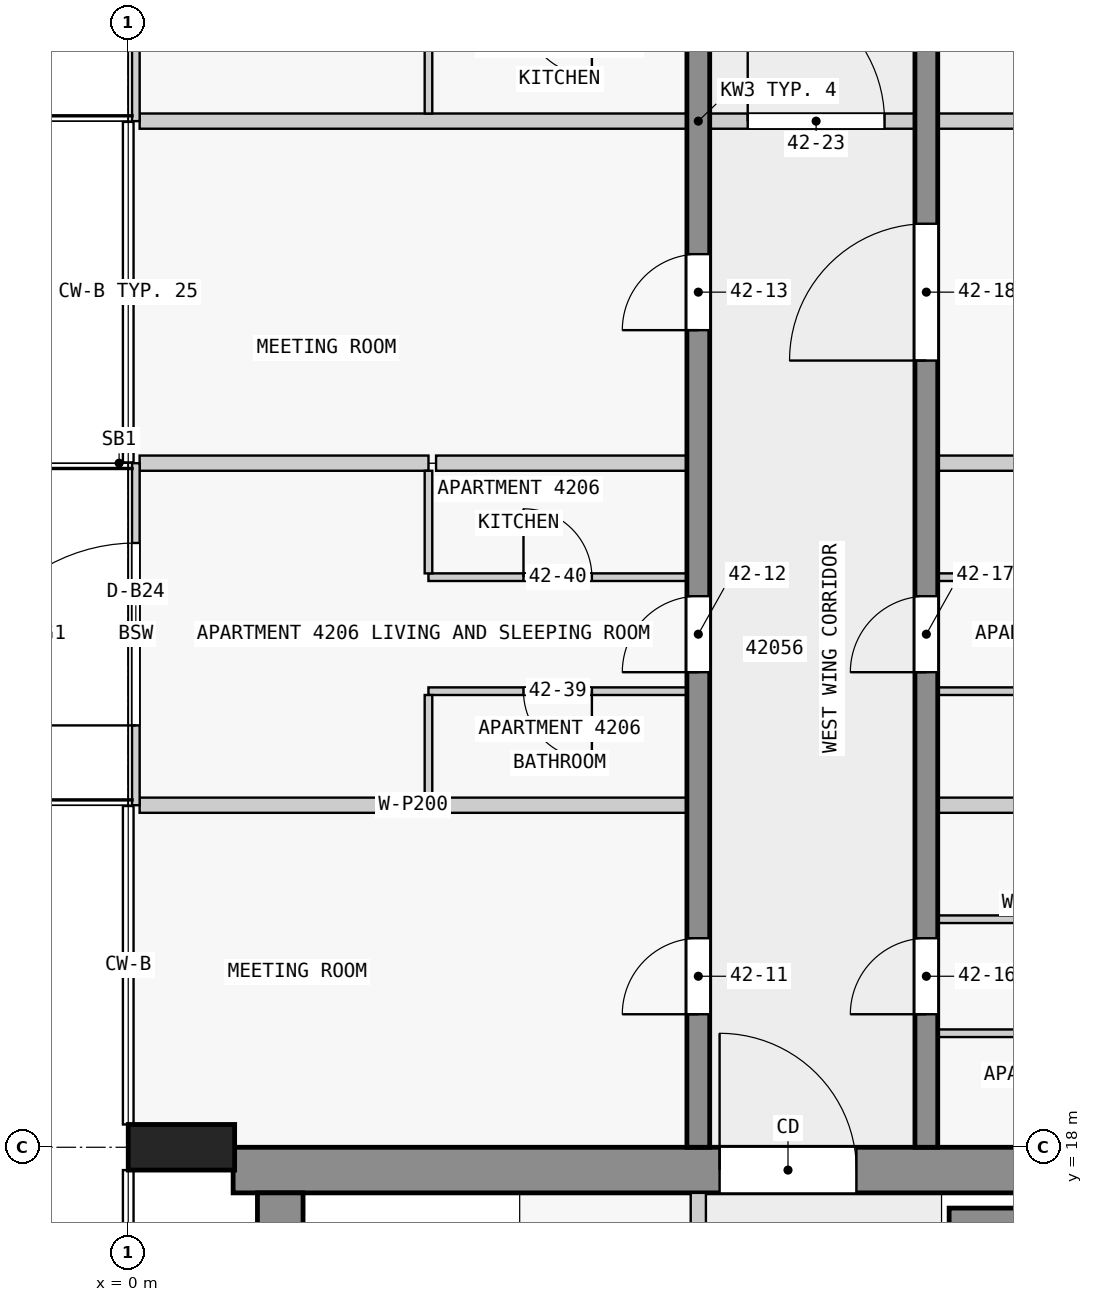
"""IFC4 building model, lengths in metres.
Left out: names, types, materials, properties, quantities, classifications, styles, units other than length and angle.
Written with IfcOpenShell. Run it as: python <this file> out.ifc"""

import sys

from ifc_helpers import new_model, si_unit, direction, frame, frame_2d, origin, origin_2d, place, context, subcontext, project, spatial, rectangle, extrude, element, fill, save


model = new_model("IFC4")
c1 = context("Model", 3, precision=1e-05, world=origin(), true_north=direction((0.0, 1.0)))
c2 = subcontext(c1, "Body", "Model", "MODEL_VIEW")
j1 = project(units=[si_unit("LENGTHUNIT", "METRE"), si_unit("PLANEANGLEUNIT", "RADIAN")], contexts=[c1])
p1 = place(None, origin())
s1 = spatial("IfcSite", under=j1, at=p1, CompositionType="ELEMENT")
p2 = place(p1, origin())
s2 = spatial("IfcBuilding", under=s1, at=p2, CompositionType="ELEMENT")
p3 = place(p2, frame((0.0, 0.0, 163.9)))
s3 = spatial("IfcBuildingStorey", under=s2, at=p3, CompositionType="ELEMENT", Elevation=163.9)
p4 = place(p3, frame((0.7, 18.0, 0.0), z_axis=(0.0, 0.0, 1.0), x_axis=(0.0, 1.0, 0.0)))
e1 = element("IfcColumn", 1, at=p4, inside=s3, PredefinedType="COLUMN", context=c2, shape_type="SweptSolid", body=[
    extrude(rectangle(XDim=0.6, YDim=1.4, at=origin_2d()), origin(), (0.0, 0.0, 1.0), 3.5),
])
p5 = place(p3, frame((1.38, 17.7, 0.0), z_axis=(0.0, 0.0, 1.0), x_axis=(1.0, 0.0, 0.0)))
e2 = element("IfcWall", 2, at=p5, inside=s3, PredefinedType="SHEAR", context=c2, shape_type="SweptSolid", body=[
    extrude(rectangle(XDim=21.12, YDim=0.6, at=frame_2d((10.56, 0.0))), origin(), (0.0, 0.0, 1.0), 3.25),
])
p6 = place(p5, frame((6.4, 0.0, 0.0)))
e3 = element("IfcOpeningElement", 3, at=p6, cuts=e2, PredefinedType="OPENING", context=c2, shape_type="SweptSolid", body=[
    extrude(rectangle(XDim=1.8, YDim=2.1, at=frame_2d((0.9, 1.05))), frame((0.0, 0.31, 0.0), z_axis=(0.0, -1.0, 0.0), x_axis=(1.0, 0.0, 0.0)), (0.0, 0.0, 1.0), 0.62),
])
p7 = place(p3, frame((2.0, 2.5, 0.0), z_axis=(0.0, 0.0, 1.0), x_axis=(0.0, 1.0, 0.0)))
e4 = element("IfcWall", 4, at=p7, inside=s3, PredefinedType="SHEAR", context=c2, shape_type="SweptSolid", body=[
    extrude(rectangle(XDim=14.9, YDim=0.6, at=frame_2d((7.45, 0.0))), origin(), (0.0, 0.0, 1.0), 3.25),
])
p8 = place(p3, frame((10.8, 17.05, 0.0), z_axis=(0.0, 0.0, 1.0), x_axis=(1.0, 0.0, 0.0)))
e5 = element("IfcWall", 5, at=p8, inside=s3, PredefinedType="SHEAR", context=c2, shape_type="SweptSolid", body=[
    extrude(rectangle(XDim=7.8, YDim=0.3, at=frame_2d((3.9, 0.0))), origin(), (0.0, 0.0, 1.0), 3.25),
])
p9 = place(p3, frame((7.5, 18.0, 0.0), z_axis=(0.0, 0.0, 1.0), x_axis=(0.0, 1.0, 0.0)))
e6 = element("IfcWall", 6, at=p9, inside=s3, PredefinedType="SHEAR", context=c2, shape_type="SweptSolid", body=[
    extrude(rectangle(XDim=27.0, YDim=0.3, at=frame_2d((13.5, 0.0))), origin(), (0.0, 0.0, 1.0), 3.25),
])
p10 = place(p9, frame((1.75, 0.0, 0.0)))
e7 = element("IfcOpeningElement", 7, at=p10, cuts=e6, PredefinedType="OPENING", context=c2, shape_type="SweptSolid", body=[
    extrude(rectangle(XDim=1.0, YDim=2.1, at=frame_2d((0.5, 1.05))), frame((0.0, 0.16, 0.0), z_axis=(0.0, -1.0, 0.0), x_axis=(1.0, 0.0, 0.0)), (0.0, 0.0, 1.0), 0.32),
])
p11 = place(p9, frame((6.25, 0.0, 0.0)))
e8 = element("IfcOpeningElement", 8, at=p11, cuts=e6, PredefinedType="OPENING", context=c2, shape_type="SweptSolid", body=[
    extrude(rectangle(XDim=1.0, YDim=2.1, at=frame_2d((0.5, 1.05))), frame((0.0, 0.16, 0.0), z_axis=(0.0, -1.0, 0.0), x_axis=(1.0, 0.0, 0.0)), (0.0, 0.0, 1.0), 0.32),
])
p12 = place(p9, frame((10.75, 0.0, 0.0)))
e9 = element("IfcOpeningElement", 9, at=p12, cuts=e6, PredefinedType="OPENING", context=c2, shape_type="SweptSolid", body=[
    extrude(rectangle(XDim=1.0, YDim=2.1, at=frame_2d((0.5, 1.05))), frame((0.0, 0.16, 0.0), z_axis=(0.0, -1.0, 0.0), x_axis=(1.0, 0.0, 0.0)), (0.0, 0.0, 1.0), 0.32),
])
p13 = place(p9, frame((15.25, 0.0, 0.0)))
e10 = element("IfcOpeningElement", 10, at=p13, cuts=e6, PredefinedType="OPENING", context=c2, shape_type="SweptSolid", body=[
    extrude(rectangle(XDim=1.0, YDim=2.1, at=frame_2d((0.5, 1.05))), frame((0.0, 0.16, 0.0), z_axis=(0.0, -1.0, 0.0), x_axis=(1.0, 0.0, 0.0)), (0.0, 0.0, 1.0), 0.32),
])
p14 = place(p9, frame((21.35, 0.0, 0.0)))
e11 = element("IfcOpeningElement", 11, at=p14, cuts=e6, PredefinedType="OPENING", context=c2, shape_type="SweptSolid", body=[
    extrude(rectangle(XDim=1.0, YDim=2.1, at=frame_2d((0.5, 1.05))), frame((0.0, 0.16, 0.0), z_axis=(0.0, -1.0, 0.0), x_axis=(1.0, 0.0, 0.0)), (0.0, 0.0, 1.0), 0.32),
])
p15 = place(p3, frame((10.5, 18.0, 0.0), z_axis=(0.0, 0.0, 1.0), x_axis=(0.0, 1.0, 0.0)))
e12 = element("IfcWall", 12, at=p15, inside=s3, PredefinedType="SHEAR", context=c2, shape_type="SweptSolid", body=[
    extrude(rectangle(XDim=27.0, YDim=0.3, at=frame_2d((13.5, 0.0))), origin(), (0.0, 0.0, 1.0), 3.25),
])
p16 = place(p15, frame((1.75, 0.0, 0.0)))
e13 = element("IfcOpeningElement", 13, at=p16, cuts=e12, PredefinedType="OPENING", context=c2, shape_type="SweptSolid", body=[
    extrude(rectangle(XDim=1.0, YDim=2.1, at=frame_2d((0.5, 1.05))), frame((0.0, 0.16, 0.0), z_axis=(0.0, -1.0, 0.0), x_axis=(1.0, 0.0, 0.0)), (0.0, 0.0, 1.0), 0.32),
])
p17 = place(p15, frame((6.25, 0.0, 0.0)))
e14 = element("IfcOpeningElement", 14, at=p17, cuts=e12, PredefinedType="OPENING", context=c2, shape_type="SweptSolid", body=[
    extrude(rectangle(XDim=1.0, YDim=2.1, at=frame_2d((0.5, 1.05))), frame((0.0, 0.16, 0.0), z_axis=(0.0, -1.0, 0.0), x_axis=(1.0, 0.0, 0.0)), (0.0, 0.0, 1.0), 0.32),
])
p18 = place(p15, frame((10.35, 0.0, 0.0)))
e15 = element("IfcOpeningElement", 15, at=p18, cuts=e12, PredefinedType="OPENING", context=c2, shape_type="SweptSolid", body=[
    extrude(rectangle(XDim=1.8, YDim=2.1, at=frame_2d((0.9, 1.05))), frame((0.0, 0.16, 0.0), z_axis=(0.0, -1.0, 0.0), x_axis=(1.0, 0.0, 0.0)), (0.0, 0.0, 1.0), 0.32),
])
p19 = place(p15, frame((17.55, 0.0, 0.0)))
e16 = element("IfcOpeningElement", 16, at=p19, cuts=e12, PredefinedType="OPENING", context=c2, shape_type="SweptSolid", body=[
    extrude(rectangle(XDim=1.0, YDim=2.1, at=frame_2d((0.5, 1.05))), frame((0.0, 0.16, 0.0), z_axis=(0.0, -1.0, 0.0), x_axis=(1.0, 0.0, 0.0)), (0.0, 0.0, 1.0), 0.32),
])
p20 = place(p15, frame((23.25, 0.0, 0.0)))
e17 = element("IfcOpeningElement", 17, at=p20, cuts=e12, PredefinedType="OPENING", context=c2, shape_type="SweptSolid", body=[
    extrude(rectangle(XDim=0.9, YDim=2.1, at=frame_2d((0.45, 1.05))), frame((0.0, 0.16, 0.0), z_axis=(0.0, -1.0, 0.0), x_axis=(1.0, 0.0, 0.0)), (0.0, 0.0, 1.0), 0.32),
])
p21 = place(p15, frame((25.45, 0.0, 0.0)))
e18 = element("IfcOpeningElement", 18, at=p21, cuts=e12, PredefinedType="OPENING", context=c2, shape_type="SweptSolid", body=[
    extrude(rectangle(XDim=1.0, YDim=2.1, at=frame_2d((0.5, 1.05))), frame((0.0, 0.16, 0.0), z_axis=(0.0, -1.0, 0.0), x_axis=(1.0, 0.0, 0.0)), (0.0, 0.0, 1.0), 0.32),
])
p22 = place(p3, frame((0.1, 22.5, 0.0), z_axis=(0.0, 0.0, 1.0), x_axis=(0.0, 1.0, 0.0)))
e19 = element("IfcWall", 19, at=p22, inside=s3, PredefinedType="STANDARD", context=c2, shape_type="SweptSolid", body=[
    extrude(rectangle(XDim=4.5, YDim=0.1, at=frame_2d((2.25, 0.0))), origin(), (0.0, 0.0, 1.0), 3.25),
])
p23 = place(p22, frame((1.05, 0.0, 0.0)))
e20 = element("IfcOpeningElement", 20, at=p23, cuts=e19, PredefinedType="OPENING", context=c2, shape_type="SweptSolid", body=[
    extrude(rectangle(XDim=2.4, YDim=2.4, at=frame_2d((1.2, 1.2))), frame((0.0, 0.06, 0.0), z_axis=(0.0, -1.0, 0.0), x_axis=(1.0, 0.0, 0.0)), (0.0, 0.0, 1.0), 0.12),
])
p24 = place(p3, frame((0.1, 31.5, 0.0), z_axis=(0.0, 0.0, 1.0), x_axis=(0.0, 1.0, 0.0)))
e21 = element("IfcWall", 21, at=p24, inside=s3, PredefinedType="STANDARD", context=c2, shape_type="SweptSolid", body=[
    extrude(rectangle(XDim=4.5, YDim=0.1, at=frame_2d((2.25, 0.0))), origin(), (0.0, 0.0, 1.0), 3.25),
])
p25 = place(p24, frame((1.05, 0.0, 0.0)))
e22 = element("IfcOpeningElement", 22, at=p25, cuts=e21, PredefinedType="OPENING", context=c2, shape_type="SweptSolid", body=[
    extrude(rectangle(XDim=2.4, YDim=2.4, at=frame_2d((1.2, 1.2))), frame((0.0, 0.06, 0.0), z_axis=(0.0, -1.0, 0.0), x_axis=(1.0, 0.0, 0.0)), (0.0, 0.0, 1.0), 0.12),
])
p26 = place(p3, frame((7.5, 10.1, 0.0), z_axis=(0.0, 0.0, 1.0), x_axis=(0.0, 1.0, 0.0)))
e23 = element("IfcWall", 23, at=p26, inside=s3, PredefinedType="PARTITIONING", context=c2, shape_type="SweptSolid", body=[
    extrude(rectangle(XDim=7.3, YDim=0.2, at=frame_2d((3.65, 0.0))), origin(), (0.0, 0.0, 1.0), 3.25),
])
p27 = place(p26, frame((1.05, 0.0, 0.0)))
e24 = element("IfcOpeningElement", 24, at=p27, cuts=e23, PredefinedType="OPENING", context=c2, shape_type="SweptSolid", body=[
    extrude(rectangle(XDim=0.9, YDim=2.1, at=frame_2d((0.45, 1.05))), frame((0.0, 0.11, 0.0), z_axis=(0.0, -1.0, 0.0), x_axis=(1.0, 0.0, 0.0)), (0.0, 0.0, 1.0), 0.22),
])
p28 = place(p26, frame((4.7, 0.0, 0.0)))
e25 = element("IfcOpeningElement", 25, at=p28, cuts=e23, PredefinedType="OPENING", context=c2, shape_type="SweptSolid", body=[
    extrude(rectangle(XDim=0.9, YDim=2.1, at=frame_2d((0.45, 1.05))), frame((0.0, 0.11, 0.0), z_axis=(0.0, -1.0, 0.0), x_axis=(1.0, 0.0, 0.0)), (0.0, 0.0, 1.0), 0.22),
])
p29 = place(p3, frame((14.05, 19.5, 0.0), z_axis=(0.0, 0.0, 1.0), x_axis=(-1.0, 0.0, 0.0)))
e26 = element("IfcWall", 26, at=p29, inside=s3, PredefinedType="PARTITIONING", context=c2, shape_type="SweptSolid", body=[
    extrude(rectangle(XDim=3.4, YDim=0.1, at=frame_2d((1.7, 0.0))), origin(), (0.0, 0.0, 1.0), 3.25),
])
p30 = place(p29, frame((1.25, 0.0, 0.0)))
e27 = element("IfcOpeningElement", 27, at=p30, cuts=e26, PredefinedType="OPENING", context=c2, shape_type="SweptSolid", body=[
    extrude(rectangle(XDim=0.9, YDim=2.1, at=frame_2d((0.45, 1.05))), frame((0.0, 0.06, 0.0), z_axis=(0.0, -1.0, 0.0), x_axis=(1.0, 0.0, 0.0)), (0.0, 0.0, 1.0), 0.12),
])
p31 = place(p3, frame((10.65, 21.0, 0.0), z_axis=(0.0, 0.0, 1.0), x_axis=(1.0, 0.0, 0.0)))
e28 = element("IfcWall", 28, at=p31, inside=s3, PredefinedType="PARTITIONING", context=c2, shape_type="SweptSolid", body=[
    extrude(rectangle(XDim=3.4, YDim=0.1, at=frame_2d((1.7, 0.0))), origin(), (0.0, 0.0, 1.0), 3.25),
])
p32 = place(p31, frame((1.25, 0.0, 0.0)))
e29 = element("IfcOpeningElement", 29, at=p32, cuts=e28, PredefinedType="OPENING", context=c2, shape_type="SweptSolid", body=[
    extrude(rectangle(XDim=0.9, YDim=2.1, at=frame_2d((0.45, 1.05))), frame((0.0, 0.06, 0.0), z_axis=(0.0, -1.0, 0.0), x_axis=(1.0, 0.0, 0.0)), (0.0, 0.0, 1.0), 0.12),
])
p33 = place(p3, frame((7.35, 22.5, 0.0), z_axis=(0.0, 0.0, 1.0), x_axis=(-1.0, 0.0, 0.0)))
e30 = element("IfcWall", 30, at=p33, inside=s3, PredefinedType="PARTITIONING", context=c2, shape_type="SweptSolid", body=[
    extrude(rectangle(XDim=7.2, YDim=0.2, at=frame_2d((3.6, 0.0))), origin(), (0.0, 0.0, 1.0), 3.25),
])
p34 = place(p3, frame((13.95, 22.5, 0.0), z_axis=(0.0, 0.0, 1.0), x_axis=(-1.0, 0.0, 0.0)))
e31 = element("IfcWall", 31, at=p34, inside=s3, PredefinedType="PARTITIONING", context=c2, shape_type="SweptSolid", body=[
    extrude(rectangle(XDim=3.3, YDim=0.2, at=frame_2d((1.65, 0.0))), origin(), (0.0, 0.0, 1.0), 3.25),
])
p35 = place(p3, frame((7.35, 24.0, 0.0), z_axis=(0.0, 0.0, 1.0), x_axis=(-1.0, 0.0, 0.0)))
e32 = element("IfcWall", 32, at=p35, inside=s3, PredefinedType="PARTITIONING", context=c2, shape_type="SweptSolid", body=[
    extrude(rectangle(XDim=3.4, YDim=0.1, at=frame_2d((1.7, 0.0))), origin(), (0.0, 0.0, 1.0), 3.25),
])
p36 = place(p35, frame((1.25, 0.0, 0.0)))
e33 = element("IfcOpeningElement", 33, at=p36, cuts=e32, PredefinedType="OPENING", context=c2, shape_type="SweptSolid", body=[
    extrude(rectangle(XDim=0.9, YDim=2.1, at=frame_2d((0.45, 1.05))), frame((0.0, 0.06, 0.0), z_axis=(0.0, -1.0, 0.0), x_axis=(1.0, 0.0, 0.0)), (0.0, 0.0, 1.0), 0.12),
])
p37 = place(p3, frame((14.05, 24.0, 0.0), z_axis=(0.0, 0.0, 1.0), x_axis=(-1.0, 0.0, 0.0)))
e34 = element("IfcWall", 34, at=p37, inside=s3, PredefinedType="PARTITIONING", context=c2, shape_type="SweptSolid", body=[
    extrude(rectangle(XDim=3.4, YDim=0.1, at=frame_2d((1.7, 0.0))), origin(), (0.0, 0.0, 1.0), 3.25),
])
p38 = place(p37, frame((1.25, 0.0, 0.0)))
e35 = element("IfcOpeningElement", 35, at=p38, cuts=e34, PredefinedType="OPENING", context=c2, shape_type="SweptSolid", body=[
    extrude(rectangle(XDim=0.9, YDim=2.1, at=frame_2d((0.45, 1.05))), frame((0.0, 0.06, 0.0), z_axis=(0.0, -1.0, 0.0), x_axis=(1.0, 0.0, 0.0)), (0.0, 0.0, 1.0), 0.12),
])
p39 = place(p3, frame((3.95, 25.5, 0.0), z_axis=(0.0, 0.0, 1.0), x_axis=(1.0, 0.0, 0.0)))
e36 = element("IfcWall", 36, at=p39, inside=s3, PredefinedType="PARTITIONING", context=c2, shape_type="SweptSolid", body=[
    extrude(rectangle(XDim=3.4, YDim=0.1, at=frame_2d((1.7, 0.0))), origin(), (0.0, 0.0, 1.0), 3.25),
])
p40 = place(p39, frame((1.25, 0.0, 0.0)))
e37 = element("IfcOpeningElement", 37, at=p40, cuts=e36, PredefinedType="OPENING", context=c2, shape_type="SweptSolid", body=[
    extrude(rectangle(XDim=0.9, YDim=2.1, at=frame_2d((0.45, 1.05))), frame((0.0, 0.06, 0.0), z_axis=(0.0, -1.0, 0.0), x_axis=(1.0, 0.0, 0.0)), (0.0, 0.0, 1.0), 0.12),
])
p41 = place(p3, frame((10.65, 25.5, 0.0), z_axis=(0.0, 0.0, 1.0), x_axis=(1.0, 0.0, 0.0)))
e38 = element("IfcWall", 38, at=p41, inside=s3, PredefinedType="PARTITIONING", context=c2, shape_type="SweptSolid", body=[
    extrude(rectangle(XDim=3.4, YDim=0.1, at=frame_2d((1.7, 0.0))), origin(), (0.0, 0.0, 1.0), 3.25),
])
p42 = place(p41, frame((1.25, 0.0, 0.0)))
e39 = element("IfcOpeningElement", 39, at=p42, cuts=e38, PredefinedType="OPENING", context=c2, shape_type="SweptSolid", body=[
    extrude(rectangle(XDim=0.9, YDim=2.1, at=frame_2d((0.45, 1.05))), frame((0.0, 0.06, 0.0), z_axis=(0.0, -1.0, 0.0), x_axis=(1.0, 0.0, 0.0)), (0.0, 0.0, 1.0), 0.12),
])
for number, where, z_axis, x_axis in (
    (40, (7.35, 27.0, 0.0), (0.0, 0.0, 1.0), (-1.0, 0.0, 0.0)),
    (41, (13.95, 27.0, 0.0), (0.0, 0.0, 1.0), (-1.0, 0.0, 0.0)),
):
    element("IfcWall", number, at=place(p3, frame(where, z_axis=z_axis, x_axis=x_axis)), inside=s3, PredefinedType="PARTITIONING", context=c2, shape_type="SweptSolid", body=[
        extrude(rectangle(XDim=3.3, YDim=0.2, at=frame_2d((1.65, 0.0))), origin(), (0.0, 0.0, 1.0), 3.25),
    ])
p43 = place(p3, frame((0.15, 27.0, 0.0), z_axis=(0.0, 0.0, 1.0), x_axis=(1.0, 0.0, 0.0)))
e42 = element("IfcWall", 42, at=p43, inside=s3, PredefinedType="PARTITIONING", context=c2, shape_type="SweptSolid", body=[
    extrude(rectangle(XDim=3.8, YDim=0.2, at=frame_2d((1.9, 0.0))), origin(), (0.0, 0.0, 1.0), 3.25),
])
for number, where, z_axis, x_axis in (
    (43, (7.35, 31.5, 0.0), (0.0, 0.0, 1.0), (-1.0, 0.0, 0.0)),
    (44, (17.85, 31.5, 0.0), (0.0, 0.0, 1.0), (-1.0, 0.0, 0.0)),
):
    element("IfcWall", number, at=place(p3, frame(where, z_axis=z_axis, x_axis=x_axis)), inside=s3, PredefinedType="PARTITIONING", context=c2, shape_type="SweptSolid", body=[
        extrude(rectangle(XDim=7.2, YDim=0.2, at=frame_2d((3.6, 0.0))), origin(), (0.0, 0.0, 1.0), 3.25),
    ])
for number, where, z_axis, x_axis in (
    (45, (3.95, 23.95, 0.0), (0.0, 0.0, 1.0), (0.0, -1.0, 0.0)),
    (46, (3.95, 26.9, 0.0), (0.0, 0.0, 1.0), (0.0, -1.0, 0.0)),
    (47, (3.95, 32.95, 0.0), (0.0, 0.0, 1.0), (0.0, -1.0, 0.0)),
):
    element("IfcWall", number, at=place(p3, frame(where, z_axis=z_axis, x_axis=x_axis)), inside=s3, PredefinedType="PARTITIONING", context=c2, shape_type="SweptSolid", body=[
        extrude(rectangle(XDim=1.35, YDim=0.1, at=frame_2d((0.675, 0.0))), origin(), (0.0, 0.0, 1.0), 3.25),
    ])
p44 = place(p3, frame((7.45, 31.5, 0.0), z_axis=(0.0, 0.0, 1.0), x_axis=(1.0, 0.0, 0.0)))
e48 = element("IfcWall", 48, at=p44, inside=s3, PredefinedType="PARTITIONING", context=c2, shape_type="SweptSolid", body=[
    extrude(rectangle(XDim=3.1, YDim=0.2, at=frame_2d((1.55, 0.0))), origin(), (0.0, 0.0, 1.0), 3.25),
])
p45 = place(p44, frame((0.7, 0.0, 0.0)))
e49 = element("IfcOpeningElement", 49, at=p45, cuts=e48, PredefinedType="OPENING", context=c2, shape_type="SweptSolid", body=[
    extrude(rectangle(XDim=1.8, YDim=2.1, at=frame_2d((0.9, 1.05))), frame((0.0, 0.11, 0.0), z_axis=(0.0, -1.0, 0.0), x_axis=(1.0, 0.0, 0.0)), (0.0, 0.0, 1.0), 0.22),
])
p46 = place(p23, origin())
e50 = element("IfcDoor", 50, at=p46, inside=s3, OperationType="SINGLE_SWING_LEFT", PredefinedType="DOOR", context=c2, shape_type="SweptSolid", body=[
    extrude(rectangle(XDim=2.4, YDim=2.4, at=frame_2d((1.2, 1.2))), frame((0.0, 0.025, 0.0), z_axis=(0.0, -1.0, 0.0), x_axis=(1.0, 0.0, 0.0)), (0.0, 0.0, 1.0), 0.05),
])
fill(e20, e50)
p47 = place(p6, origin())
e51 = element("IfcDoor", 51, at=p47, inside=s3, OperationType="DOUBLE_DOOR_SINGLE_SWING", PredefinedType="DOOR", context=c2, shape_type="SweptSolid", body=[
    extrude(rectangle(XDim=1.8, YDim=2.1, at=frame_2d((0.9, 1.05))), frame((0.0, 0.025, 0.0), z_axis=(0.0, -1.0, 0.0), x_axis=(1.0, 0.0, 0.0)), (0.0, 0.0, 1.0), 0.05),
])
fill(e3, e51)
p48 = place(p10, origin())
e52 = element("IfcDoor", 52, at=p48, inside=s3, OperationType="SINGLE_SWING_LEFT", PredefinedType="DOOR", context=c2, shape_type="SweptSolid", body=[
    extrude(rectangle(XDim=1.0, YDim=2.1, at=frame_2d((0.5, 1.05))), frame((0.0, 0.025, 0.0), z_axis=(0.0, -1.0, 0.0), x_axis=(1.0, 0.0, 0.0)), (0.0, 0.0, 1.0), 0.05),
])
fill(e7, e52)
p49 = place(p11, origin())
e53 = element("IfcDoor", 53, at=p49, inside=s3, OperationType="SINGLE_SWING_LEFT", PredefinedType="DOOR", context=c2, shape_type="SweptSolid", body=[
    extrude(rectangle(XDim=1.0, YDim=2.1, at=frame_2d((0.5, 1.05))), frame((0.0, 0.025, 0.0), z_axis=(0.0, -1.0, 0.0), x_axis=(1.0, 0.0, 0.0)), (0.0, 0.0, 1.0), 0.05),
])
fill(e8, e53)
p50 = place(p12, origin())
e54 = element("IfcDoor", 54, at=p50, inside=s3, OperationType="SINGLE_SWING_LEFT", PredefinedType="DOOR", context=c2, shape_type="SweptSolid", body=[
    extrude(rectangle(XDim=1.0, YDim=2.1, at=frame_2d((0.5, 1.05))), frame((0.0, 0.025, 0.0), z_axis=(0.0, -1.0, 0.0), x_axis=(1.0, 0.0, 0.0)), (0.0, 0.0, 1.0), 0.05),
])
fill(e9, e54)
p51 = place(p16, origin())
e55 = element("IfcDoor", 55, at=p51, inside=s3, OperationType="SINGLE_SWING_LEFT", PredefinedType="DOOR", context=c2, shape_type="SweptSolid", body=[
    extrude(rectangle(XDim=1.0, YDim=2.1, at=frame_2d((0.5, 1.05))), frame((0.0, 0.025, 0.0), z_axis=(0.0, -1.0, 0.0), x_axis=(1.0, 0.0, 0.0)), (0.0, 0.0, 1.0), 0.05),
])
fill(e13, e55)
p52 = place(p17, origin())
e56 = element("IfcDoor", 56, at=p52, inside=s3, OperationType="SINGLE_SWING_LEFT", PredefinedType="DOOR", context=c2, shape_type="SweptSolid", body=[
    extrude(rectangle(XDim=1.0, YDim=2.1, at=frame_2d((0.5, 1.05))), frame((0.0, 0.025, 0.0), z_axis=(0.0, -1.0, 0.0), x_axis=(1.0, 0.0, 0.0)), (0.0, 0.0, 1.0), 0.05),
])
fill(e14, e56)
p53 = place(p18, origin())
e57 = element("IfcDoor", 57, at=p53, inside=s3, OperationType="SINGLE_SWING_LEFT", PredefinedType="DOOR", context=c2, shape_type="SweptSolid", body=[
    extrude(rectangle(XDim=1.8, YDim=2.1, at=frame_2d((0.9, 1.05))), frame((0.0, 0.025, 0.0), z_axis=(0.0, -1.0, 0.0), x_axis=(1.0, 0.0, 0.0)), (0.0, 0.0, 1.0), 0.05),
])
fill(e15, e57)
p54 = place(p45, origin())
e58 = element("IfcDoor", 58, at=p54, inside=s3, OperationType="SINGLE_SWING_RIGHT", PredefinedType="DOOR", context=c2, shape_type="SweptSolid", body=[
    extrude(rectangle(XDim=1.8, YDim=2.1, at=frame_2d((0.9, 1.05))), frame((0.0, 0.025, 0.0), z_axis=(0.0, -1.0, 0.0), x_axis=(1.0, 0.0, 0.0)), (0.0, 0.0, 1.0), 0.05),
])
fill(e49, e58)
p55 = place(p36, origin())
e59 = element("IfcDoor", 59, at=p55, inside=s3, OperationType="SINGLE_SWING_RIGHT", PredefinedType="DOOR", context=c2, shape_type="SweptSolid", body=[
    extrude(rectangle(XDim=0.9, YDim=2.1, at=frame_2d((0.45, 1.05))), frame((0.0, 0.025, 0.0), z_axis=(0.0, -1.0, 0.0), x_axis=(1.0, 0.0, 0.0)), (0.0, 0.0, 1.0), 0.05),
])
fill(e33, e59)
p56 = place(p40, origin())
e60 = element("IfcDoor", 60, at=p56, inside=s3, OperationType="SINGLE_SWING_RIGHT", PredefinedType="DOOR", context=c2, shape_type="SweptSolid", body=[
    extrude(rectangle(XDim=0.9, YDim=2.1, at=frame_2d((0.45, 1.05))), frame((0.0, 0.025, 0.0), z_axis=(0.0, -1.0, 0.0), x_axis=(1.0, 0.0, 0.0)), (0.0, 0.0, 1.0), 0.05),
])
fill(e37, e60)
save(model, sys.argv[1])
